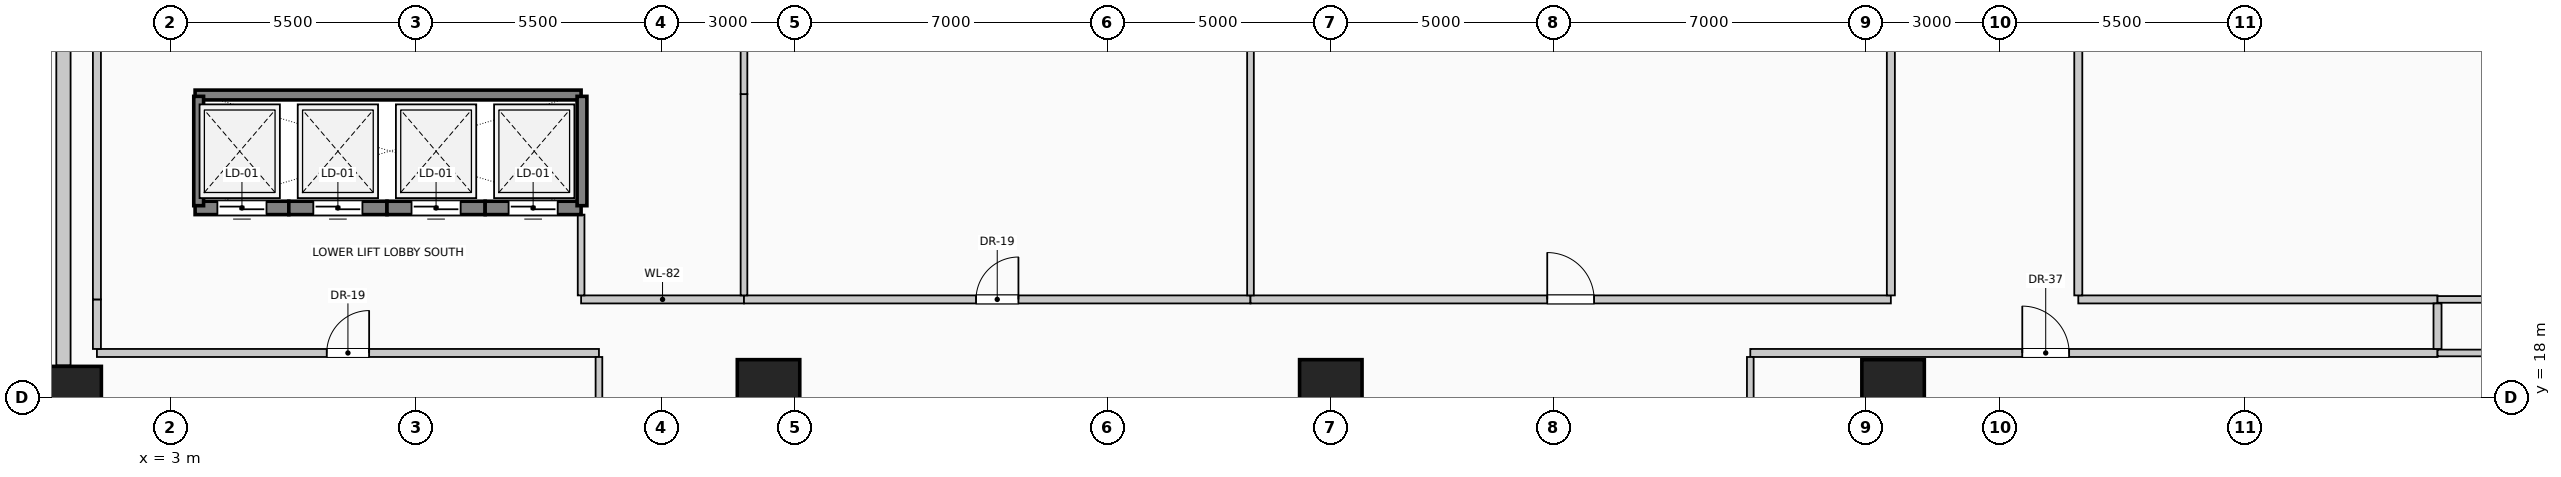
"""IFC4 building model, lengths in metres.
Left out: names, types, materials, properties, quantities, classifications, styles, units other than length and angle.
Written with IfcOpenShell. Run it as: python <this file> out.ifc"""

import sys

from ifc_helpers import new_model, si_unit, direction, frame, frame_2d, origin, origin_2d, place, context, subcontext, project, spatial, rectangle, extrude, element, fill, save


model = new_model("IFC4")
c1 = context("Model", 3, precision=1e-05, world=origin(), true_north=direction((0.0, 1.0)))
c2 = subcontext(c1, "Body", "Model", "MODEL_VIEW")
j1 = project(units=[si_unit("LENGTHUNIT", "METRE"), si_unit("PLANEANGLEUNIT", "RADIAN")], contexts=[c1])
p1 = place(None, origin())
s1 = spatial("IfcSite", under=j1, at=p1, CompositionType="ELEMENT")
p2 = place(p1, origin())
s2 = spatial("IfcBuilding", under=s1, at=p2, CompositionType="ELEMENT")
p3 = place(p2, frame((0.0, 0.0, 13.5)))
s3 = spatial("IfcBuildingStorey", under=s2, at=p3, CompositionType="ELEMENT", Elevation=13.5)
for number, where, z_axis, x_axis in (
    (1, (0.6, 18.0, 0.0), (0.0, 0.0, 1.0), (0.0, 1.0, 0.0)),
    (2, (16.4, 18.0, 0.0), (0.0, 0.0, 1.0), (1.0, 0.0, 0.0)),
    (3, (29.0, 18.0, 0.0), (0.0, 0.0, 1.0), (1.0, 0.0, 0.0)),
    (4, (41.6, 18.0, 0.0), (0.0, 0.0, 1.0), (1.0, 0.0, 0.0)),
):
    element("IfcColumn", number, at=place(p3, frame(where, z_axis=z_axis, x_axis=x_axis)), inside=s3, PredefinedType="COLUMN", context=c2, shape_type="SweptSolid", body=[
        extrude(rectangle(XDim=1.4, YDim=1.7, at=origin_2d()), origin(), (0.0, 0.0, 1.0), 4.05),
    ])
p4 = place(p3, frame((0.6, 18.72, 0.0), z_axis=(0.0, 0.0, 1.0), x_axis=(0.0, 1.0, 0.0)))
e5 = element("IfcWall", 5, at=p4, inside=s3, PredefinedType="SOLIDWALL", context=c2, shape_type="SweptSolid", body=[
    extrude(rectangle(XDim=14.56, YDim=0.32, at=frame_2d((7.28, 0.0))), origin(), (0.0, 0.0, 1.0), 2.7),
])
p5 = place(p3, frame((5.65, 22.25, 0.0), z_axis=(0.0, 0.0, 1.0), x_axis=(-1.0, 0.0, 0.0)))
e6 = element("IfcWall", 6, at=p5, inside=s3, PredefinedType="SOLIDWALL", context=c2, shape_type="SweptSolid", body=[
    extrude(rectangle(XDim=2.1, YDim=0.3, at=frame_2d((1.05, 0.0))), origin(), (0.0, 0.0, 1.0), 4.05),
])
p6 = place(p5, frame((0.5, 0.0, 0.0)))
e7 = element("IfcOpeningElement", 7, at=p6, cuts=e6, PredefinedType="OPENING", context=c2, shape_type="SweptSolid", body=[
    extrude(rectangle(XDim=1.1, YDim=2.2, at=frame_2d((0.55, 1.1))), frame((0.0, 0.16, 0.0), z_axis=(0.0, -1.0, 0.0), x_axis=(1.0, 0.0, 0.0)), (0.0, 0.0, 1.0), 0.32),
])
p7 = place(p3, frame((7.85, 22.25, 0.0), z_axis=(0.0, 0.0, 1.0), x_axis=(-1.0, 0.0, 0.0)))
e8 = element("IfcWall", 8, at=p7, inside=s3, PredefinedType="SOLIDWALL", context=c2, shape_type="SweptSolid", body=[
    extrude(rectangle(XDim=2.2, YDim=0.3, at=frame_2d((1.1, 0.0))), origin(), (0.0, 0.0, 1.0), 4.05),
])
p8 = place(p7, frame((0.55, 0.0, 0.0)))
e9 = element("IfcOpeningElement", 9, at=p8, cuts=e8, PredefinedType="OPENING", context=c2, shape_type="SweptSolid", body=[
    extrude(rectangle(XDim=1.1, YDim=2.2, at=frame_2d((0.55, 1.1))), frame((0.0, 0.16, 0.0), z_axis=(0.0, -1.0, 0.0), x_axis=(1.0, 0.0, 0.0)), (0.0, 0.0, 1.0), 0.32),
])
p9 = place(p3, frame((10.05, 22.25, 0.0), z_axis=(0.0, 0.0, 1.0), x_axis=(-1.0, 0.0, 0.0)))
e10 = element("IfcWall", 10, at=p9, inside=s3, PredefinedType="SOLIDWALL", context=c2, shape_type="SweptSolid", body=[
    extrude(rectangle(XDim=2.2, YDim=0.3, at=frame_2d((1.1, 0.0))), origin(), (0.0, 0.0, 1.0), 4.05),
])
p10 = place(p9, frame((0.55, 0.0, 0.0)))
e11 = element("IfcOpeningElement", 11, at=p10, cuts=e10, PredefinedType="OPENING", context=c2, shape_type="SweptSolid", body=[
    extrude(rectangle(XDim=1.1, YDim=2.2, at=frame_2d((0.55, 1.1))), frame((0.0, 0.16, 0.0), z_axis=(0.0, -1.0, 0.0), x_axis=(1.0, 0.0, 0.0)), (0.0, 0.0, 1.0), 0.32),
])
p11 = place(p3, frame((12.2, 22.25, 0.0), z_axis=(0.0, 0.0, 1.0), x_axis=(-1.0, 0.0, 0.0)))
e12 = element("IfcWall", 12, at=p11, inside=s3, PredefinedType="SOLIDWALL", context=c2, shape_type="SweptSolid", body=[
    extrude(rectangle(XDim=2.15, YDim=0.3, at=frame_2d((1.075, 0.0))), origin(), (0.0, 0.0, 1.0), 4.05),
])
p12 = place(p11, frame((0.525, 0.0, 0.0)))
e13 = element("IfcOpeningElement", 13, at=p12, cuts=e12, PredefinedType="OPENING", context=c2, shape_type="SweptSolid", body=[
    extrude(rectangle(XDim=1.1, YDim=2.2, at=frame_2d((0.55, 1.1))), frame((0.0, 0.16, 0.0), z_axis=(0.0, -1.0, 0.0), x_axis=(1.0, 0.0, 0.0)), (0.0, 0.0, 1.0), 0.32),
])
p13 = place(p3, frame((3.55, 24.78, 0.0), z_axis=(0.0, 0.0, 1.0), x_axis=(1.0, 0.0, 0.0)))
e14 = element("IfcWall", 14, at=p13, inside=s3, PredefinedType="SOLIDWALL", context=c2, shape_type="SweptSolid", body=[
    extrude(rectangle(XDim=8.65, YDim=0.22, at=frame_2d((4.325, 0.0))), origin(), (0.0, 0.0, 1.0), 4.05),
])
for number, where, z_axis, x_axis in (
    (15, (3.63, 22.3, 0.0), (0.0, 0.0, 1.0), (0.0, 1.0, 0.0)),
    (16, (12.22, 22.3, 0.0), (0.0, 0.0, 1.0), (0.0, 1.0, 0.0)),
):
    element("IfcWall", number, at=place(p3, frame(where, z_axis=z_axis, x_axis=x_axis)), inside=s3, PredefinedType="SOLIDWALL", context=c2, shape_type="SweptSolid", body=[
        extrude(rectangle(XDim=2.45, YDim=0.22, at=frame_2d((1.225, 0.0))), origin(), (0.0, 0.0, 1.0), 4.05),
    ])
p14 = place(p3, frame((1.35, 19.0, 0.0), z_axis=(0.0, 0.0, 1.0), x_axis=(1.0, 0.0, 0.0)))
e17 = element("IfcWall", 17, at=p14, inside=s3, PredefinedType="PARTITIONING", context=c2, shape_type="SweptSolid", body=[
    extrude(rectangle(XDim=11.25, YDim=0.18, at=frame_2d((5.625, 0.0))), origin(), (0.0, 0.0, 1.0), 3.65),
])
p15 = place(p14, frame((5.15, 0.0, 0.0)))
e18 = element("IfcOpeningElement", 18, at=p15, cuts=e17, PredefinedType="OPENING", context=c2, shape_type="SweptSolid", body=[
    extrude(rectangle(XDim=0.95, YDim=2.15, at=frame_2d((0.475, 1.075))), frame((0.0, 0.1, 0.0), z_axis=(0.0, -1.0, 0.0), x_axis=(1.0, 0.0, 0.0)), (0.0, 0.0, 1.0), 0.2),
])
p16 = place(p3, frame((38.4, 19.0, 0.0), z_axis=(0.0, 0.0, 1.0), x_axis=(1.0, 0.0, 0.0)))
e19 = element("IfcWall", 19, at=p16, inside=s3, PredefinedType="PARTITIONING", context=c2, shape_type="SweptSolid", body=[
    extrude(rectangle(XDim=15.4, YDim=0.18, at=frame_2d((7.7, 0.0))), origin(), (0.0, 0.0, 1.0), 3.65),
])
p17 = place(p16, frame((6.095, 0.0, 0.0)))
e20 = element("IfcOpeningElement", 20, at=p17, cuts=e19, PredefinedType="OPENING", context=c2, shape_type="SweptSolid", body=[
    extrude(rectangle(XDim=1.05, YDim=2.15, at=frame_2d((0.525, 1.075))), frame((0.0, 0.1, 0.0), z_axis=(0.0, -1.0, 0.0), x_axis=(1.0, 0.0, 0.0)), (0.0, 0.0, 1.0), 0.2),
])
p18 = place(p3, frame((53.8, 19.0, 0.0), z_axis=(0.0, 0.0, 1.0), x_axis=(1.0, 0.0, 0.0)))
e21 = element("IfcWall", 21, at=p18, inside=s3, PredefinedType="PARTITIONING", context=c2, shape_type="SweptSolid", body=[
    extrude(rectangle(XDim=3.44, YDim=0.15, at=frame_2d((1.72, 0.0))), origin(), (0.0, 0.0, 1.0), 3.65),
])
p19 = place(p3, frame((12.2, 20.2, 0.0), z_axis=(0.0, 0.0, 1.0), x_axis=(1.0, 0.0, 0.0)))
e22 = element("IfcWall", 22, at=p19, inside=s3, PredefinedType="PARTITIONING", context=c2, shape_type="SweptSolid", body=[
    extrude(rectangle(XDim=3.65, YDim=0.18, at=frame_2d((1.825, 0.0))), origin(), (0.0, 0.0, 1.0), 3.65),
])
p20 = place(p3, frame((15.85, 20.2, 0.0), z_axis=(0.0, 0.0, 1.0), x_axis=(1.0, 0.0, 0.0)))
e23 = element("IfcWall", 23, at=p20, inside=s3, PredefinedType="PARTITIONING", context=c2, shape_type="SweptSolid", body=[
    extrude(rectangle(XDim=11.35, YDim=0.18, at=frame_2d((5.675, 0.0))), origin(), (0.0, 0.0, 1.0), 3.65),
])
p21 = place(p20, frame((5.2, 0.0, 0.0)))
e24 = element("IfcOpeningElement", 24, at=p21, cuts=e23, PredefinedType="OPENING", context=c2, shape_type="SweptSolid", body=[
    extrude(rectangle(XDim=0.95, YDim=2.15, at=frame_2d((0.475, 1.075))), frame((0.0, 0.1, 0.0), z_axis=(0.0, -1.0, 0.0), x_axis=(1.0, 0.0, 0.0)), (0.0, 0.0, 1.0), 0.2),
])
p22 = place(p3, frame((27.2, 20.2, 0.0), z_axis=(0.0, 0.0, 1.0), x_axis=(1.0, 0.0, 0.0)))
e25 = element("IfcWall", 25, at=p22, inside=s3, PredefinedType="PARTITIONING", context=c2, shape_type="SweptSolid", body=[
    extrude(rectangle(XDim=14.35, YDim=0.18, at=frame_2d((7.175, 0.0))), origin(), (0.0, 0.0, 1.0), 3.65),
])
p23 = place(p22, frame((6.65, 0.0, 0.0)))
e26 = element("IfcOpeningElement", 26, at=p23, cuts=e25, PredefinedType="OPENING", context=c2, shape_type="SweptSolid", body=[
    extrude(rectangle(XDim=1.05, YDim=2.15, at=frame_2d((0.525, 1.075))), frame((0.0, 0.1, 0.0), z_axis=(0.0, -1.0, 0.0), x_axis=(1.0, 0.0, 0.0)), (0.0, 0.0, 1.0), 0.2),
])
p24 = place(p3, frame((45.75, 20.2, 0.0), z_axis=(0.0, 0.0, 1.0), x_axis=(1.0, 0.0, 0.0)))
e27 = element("IfcWall", 27, at=p24, inside=s3, PredefinedType="PARTITIONING", context=c2, shape_type="SweptSolid", body=[
    extrude(rectangle(XDim=8.05, YDim=0.18, at=frame_2d((4.025, 0.0))), origin(), (0.0, 0.0, 1.0), 3.65),
])
p25 = place(p3, frame((53.8, 20.2, 0.0), z_axis=(0.0, 0.0, 1.0), x_axis=(1.0, 0.0, 0.0)))
e28 = element("IfcWall", 28, at=p25, inside=s3, PredefinedType="PARTITIONING", context=c2, shape_type="SweptSolid", body=[
    extrude(rectangle(XDim=3.44, YDim=0.15, at=frame_2d((1.72, 0.0))), origin(), (0.0, 0.0, 1.0), 3.65),
])
p26 = place(p3, frame((1.35, 19.09, 0.0), z_axis=(0.0, 0.0, 1.0), x_axis=(0.0, 1.0, 0.0)))
e29 = element("IfcWall", 29, at=p26, inside=s3, PredefinedType="PARTITIONING", context=c2, shape_type="SweptSolid", body=[
    extrude(rectangle(XDim=1.11, YDim=0.18, at=frame_2d((0.555, 0.0))), origin(), (0.0, 0.0, 1.0), 3.65),
])
p27 = place(p3, frame((1.35, 20.2, 0.0), z_axis=(0.0, 0.0, 1.0), x_axis=(0.0, 1.0, 0.0)))
e30 = element("IfcWall", 30, at=p27, inside=s3, PredefinedType="PARTITIONING", context=c2, shape_type="SweptSolid", body=[
    extrude(rectangle(XDim=13.1, YDim=0.18, at=frame_2d((6.55, 0.0))), origin(), (0.0, 0.0, 1.0), 3.65),
])
p28 = place(p3, frame((12.2, 20.29, 0.0), z_axis=(0.0, 0.0, 1.0), x_axis=(0.0, 1.0, 0.0)))
e31 = element("IfcWall", 31, at=p28, inside=s3, PredefinedType="PARTITIONING", context=c2, shape_type="SweptSolid", body=[
    extrude(rectangle(XDim=1.81, YDim=0.15, at=frame_2d((0.905, 0.0))), origin(), (0.0, 0.0, 1.0), 3.65),
])
p29 = place(p3, frame((12.6, 1.425, 0.0), z_axis=(0.0, 0.0, 1.0), x_axis=(0.0, 1.0, 0.0)))
e32 = element("IfcWall", 32, at=p29, inside=s3, PredefinedType="PARTITIONING", context=c2, shape_type="SweptSolid", body=[
    extrude(rectangle(XDim=17.485, YDim=0.15, at=frame_2d((8.742, 0.0))), origin(), (0.0, 0.0, 1.0), 3.65),
])
p30 = place(p3, frame((15.85, 20.29, 0.0), z_axis=(0.0, 0.0, 1.0), x_axis=(0.0, 1.0, 0.0)))
e33 = element("IfcWall", 33, at=p30, inside=s3, PredefinedType="PARTITIONING", context=c2, shape_type="SweptSolid", body=[
    extrude(rectangle(XDim=4.51, YDim=0.15, at=frame_2d((2.255, 0.0))), origin(), (0.0, 0.0, 1.0), 3.65),
])
p31 = place(p3, frame((15.85, 24.8, 0.0), z_axis=(0.0, 0.0, 1.0), x_axis=(0.0, 1.0, 0.0)))
e34 = element("IfcWall", 34, at=p31, inside=s3, PredefinedType="PARTITIONING", context=c2, shape_type="SweptSolid", body=[
    extrude(rectangle(XDim=1.8, YDim=0.15, at=frame_2d((0.9, 0.0))), origin(), (0.0, 0.0, 1.0), 3.65),
])
p32 = place(p3, frame((27.2, 20.29, 0.0), z_axis=(0.0, 0.0, 1.0), x_axis=(0.0, 1.0, 0.0)))
e35 = element("IfcWall", 35, at=p32, inside=s3, PredefinedType="PARTITIONING", context=c2, shape_type="SweptSolid", body=[
    extrude(rectangle(XDim=13.835, YDim=0.15, at=frame_2d((6.917, 0.0))), origin(), (0.0, 0.0, 1.0), 3.65),
])
p33 = place(p3, frame((38.4, 1.425, 0.0), z_axis=(0.0, 0.0, 1.0), x_axis=(0.0, 1.0, 0.0)))
e36 = element("IfcWall", 36, at=p33, inside=s3, PredefinedType="PARTITIONING", context=c2, shape_type="SweptSolid", body=[
    extrude(rectangle(XDim=17.485, YDim=0.15, at=frame_2d((8.742, 0.0))), origin(), (0.0, 0.0, 1.0), 3.65),
])
p34 = place(p3, frame((41.55, 20.29, 0.0), z_axis=(0.0, 0.0, 1.0), x_axis=(0.0, 1.0, 0.0)))
e37 = element("IfcWall", 37, at=p34, inside=s3, PredefinedType="PARTITIONING", context=c2, shape_type="SweptSolid", body=[
    extrude(rectangle(XDim=12.06, YDim=0.18, at=frame_2d((6.03, 0.0))), origin(), (0.0, 0.0, 1.0), 2.695),
])
p35 = place(p3, frame((45.75, 20.29, 0.0), z_axis=(0.0, 0.0, 1.0), x_axis=(0.0, 1.0, 0.0)))
e38 = element("IfcWall", 38, at=p35, inside=s3, PredefinedType="PARTITIONING", context=c2, shape_type="SweptSolid", body=[
    extrude(rectangle(XDim=11.985, YDim=0.18, at=frame_2d((5.992, 0.0))), origin(), (0.0, 0.0, 1.0), 3.65),
])
p36 = place(p3, frame((53.8, 19.09, 0.0), z_axis=(0.0, 0.0, 1.0), x_axis=(0.0, 1.0, 0.0)))
e39 = element("IfcWall", 39, at=p36, inside=s3, PredefinedType="PARTITIONING", context=c2, shape_type="SweptSolid", body=[
    extrude(rectangle(XDim=1.02, YDim=0.18, at=frame_2d((0.51, 0.0))), origin(), (0.0, 0.0, 1.0), 3.65),
])
p37 = place(p6, origin())
e40 = element("IfcDoor", 40, at=p37, inside=s3, OperationType="SLIDING_TO_LEFT", PredefinedType="DOOR", context=c2, shape_type="SweptSolid", body=[
    extrude(rectangle(XDim=1.1, YDim=2.2, at=frame_2d((0.55, 1.1))), frame((0.0, 0.025, 0.0), z_axis=(0.0, -1.0, 0.0), x_axis=(1.0, 0.0, 0.0)), (0.0, 0.0, 1.0), 0.05),
])
fill(e7, e40)
p38 = place(p8, origin())
e41 = element("IfcDoor", 41, at=p38, inside=s3, OperationType="SLIDING_TO_RIGHT", PredefinedType="DOOR", context=c2, shape_type="SweptSolid", body=[
    extrude(rectangle(XDim=1.1, YDim=2.2, at=frame_2d((0.55, 1.1))), frame((0.0, 0.025, 0.0), z_axis=(0.0, -1.0, 0.0), x_axis=(1.0, 0.0, 0.0)), (0.0, 0.0, 1.0), 0.05),
])
fill(e9, e41)
p39 = place(p10, origin())
e42 = element("IfcDoor", 42, at=p39, inside=s3, OperationType="SLIDING_TO_LEFT", PredefinedType="DOOR", context=c2, shape_type="SweptSolid", body=[
    extrude(rectangle(XDim=1.1, YDim=2.2, at=frame_2d((0.55, 1.1))), frame((0.0, 0.025, 0.0), z_axis=(0.0, -1.0, 0.0), x_axis=(1.0, 0.0, 0.0)), (0.0, 0.0, 1.0), 0.05),
])
fill(e11, e42)
p40 = place(p12, origin())
e43 = element("IfcDoor", 43, at=p40, inside=s3, OperationType="SLIDING_TO_RIGHT", PredefinedType="DOOR", context=c2, shape_type="SweptSolid", body=[
    extrude(rectangle(XDim=1.1, YDim=2.2, at=frame_2d((0.55, 1.1))), frame((0.0, 0.025, 0.0), z_axis=(0.0, -1.0, 0.0), x_axis=(1.0, 0.0, 0.0)), (0.0, 0.0, 1.0), 0.05),
])
fill(e13, e43)
p41 = place(p15, origin())
e44 = element("IfcDoor", 44, at=p41, inside=s3, OperationType="SINGLE_SWING_RIGHT", PredefinedType="DOOR", context=c2, shape_type="SweptSolid", body=[
    extrude(rectangle(XDim=0.95, YDim=2.15, at=frame_2d((0.475, 1.075))), frame((0.0, 0.025, 0.0), z_axis=(0.0, -1.0, 0.0), x_axis=(1.0, 0.0, 0.0)), (0.0, 0.0, 1.0), 0.05),
])
fill(e18, e44)
p42 = place(p17, origin())
e45 = element("IfcDoor", 45, at=p42, inside=s3, OperationType="SINGLE_SWING_LEFT", PredefinedType="DOOR", context=c2, shape_type="SweptSolid", body=[
    extrude(rectangle(XDim=1.05, YDim=2.15, at=frame_2d((0.525, 1.075))), frame((0.0, 0.025, 0.0), z_axis=(0.0, -1.0, 0.0), x_axis=(1.0, 0.0, 0.0)), (0.0, 0.0, 1.0), 0.05),
])
fill(e20, e45)
p43 = place(p21, origin())
e46 = element("IfcDoor", 46, at=p43, inside=s3, OperationType="SINGLE_SWING_RIGHT", PredefinedType="DOOR", context=c2, shape_type="SweptSolid", body=[
    extrude(rectangle(XDim=0.95, YDim=2.15, at=frame_2d((0.475, 1.075))), frame((0.0, 0.025, 0.0), z_axis=(0.0, -1.0, 0.0), x_axis=(1.0, 0.0, 0.0)), (0.0, 0.0, 1.0), 0.05),
])
fill(e24, e46)
p44 = place(p23, origin())
e47 = element("IfcDoor", 47, at=p44, inside=s3, OperationType="SINGLE_SWING_LEFT", PredefinedType="DOOR", context=c2, shape_type="SweptSolid", body=[
    extrude(rectangle(XDim=1.05, YDim=2.15, at=frame_2d((0.525, 1.075))), frame((0.0, 0.025, 0.0), z_axis=(0.0, -1.0, 0.0), x_axis=(1.0, 0.0, 0.0)), (0.0, 0.0, 1.0), 0.05),
])
fill(e26, e47)
save(model, sys.argv[1])
